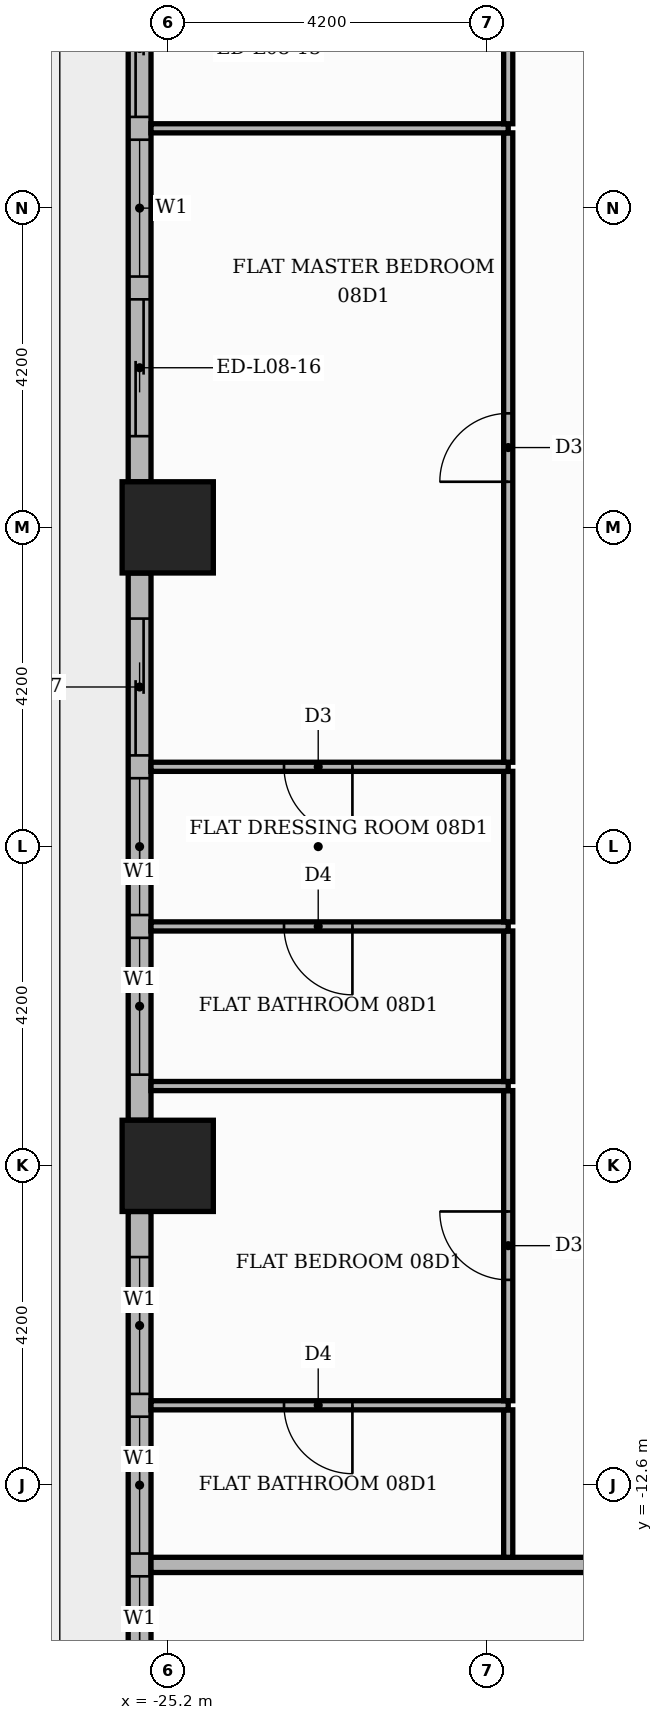
"""IFC4 building model, lengths in metres.
Left out: names, types, materials, properties, quantities, classifications, styles, units other than length and angle.
Written with IfcOpenShell. Run it as: python <this file> out.ifc"""

import sys

from ifc_helpers import new_model, si_unit, direction, frame, frame_2d, origin, origin_2d, place, context, subcontext, project, spatial, rectangle, extrude, element, fill, save


model = new_model("IFC4")
c1 = context("Model", 3, precision=1e-05, world=origin(), true_north=direction((0.0, 1.0)))
c2 = subcontext(c1, "Body", "Model", "MODEL_VIEW")
j1 = project(units=[si_unit("LENGTHUNIT", "METRE"), si_unit("PLANEANGLEUNIT", "RADIAN")], contexts=[c1])
p1 = place(None, origin())
s1 = spatial("IfcSite", under=j1, at=p1, CompositionType="ELEMENT")
p2 = place(p1, origin())
s2 = spatial("IfcBuilding", under=s1, at=p2, CompositionType="ELEMENT")
p3 = place(p2, frame((0.0, 0.0, 38.7)))
s3 = spatial("IfcBuildingStorey", under=s2, at=p3, CompositionType="ELEMENT", Elevation=38.7)
for number, where, z_axis, x_axis in (
    (1, (-25.2, 0.0, 0.0), (0.0, 0.0, 1.0), (1.0, 0.0, 0.0)),
    (2, (-25.2, -8.4, 0.0), (0.0, 0.0, 1.0), (1.0, 0.0, 0.0)),
):
    element("IfcColumn", number, at=place(p3, frame(where, z_axis=z_axis, x_axis=x_axis)), inside=s3, PredefinedType="COLUMN", context=c2, shape_type="SweptSolid", body=[
        extrude(rectangle(XDim=1.2, YDim=1.2, at=origin_2d()), origin(), (0.0, 0.0, 1.0), 3.9),
    ])
p4 = place(p3, frame((-25.57, 7.8, 0.0), z_axis=(0.0, 0.0, 1.0), x_axis=(0.0, -1.0, 0.0)))
e3 = element("IfcWall", 3, at=p4, inside=s3, PredefinedType="STANDARD", context=c2, shape_type="SweptSolid", body=[
    extrude(rectangle(XDim=7.2, YDim=0.3, at=frame_2d((3.6, 0.0))), origin(), (0.0, 0.0, 1.0), 3.48),
])
p5 = place(p4, frame((0.6, 0.0, 0.0)))
e4 = element("IfcOpeningElement", 4, at=p5, cuts=e3, PredefinedType="OPENING", context=c2, shape_type="SweptSolid", body=[
    extrude(rectangle(XDim=1.8, YDim=2.4, at=frame_2d((0.9, 1.2))), frame((0.0, 0.16, 0.0), z_axis=(0.0, -1.0, 0.0), x_axis=(1.0, 0.0, 0.0)), (0.0, 0.0, 1.0), 0.32),
])
p6 = place(p4, frame((2.7, 0.0, 0.9)))
e5 = element("IfcOpeningElement", 5, at=p6, cuts=e3, PredefinedType="OPENING", context=c2, shape_type="SweptSolid", body=[
    extrude(rectangle(XDim=1.8, YDim=2.1, at=frame_2d((0.9, 1.05))), frame((0.0, 0.16, 0.0), z_axis=(0.0, -1.0, 0.0), x_axis=(1.0, 0.0, 0.0)), (0.0, 0.0, 1.0), 0.32),
])
p7 = place(p4, frame((4.8, 0.0, 0.0)))
e6 = element("IfcOpeningElement", 6, at=p7, cuts=e3, PredefinedType="OPENING", context=c2, shape_type="SweptSolid", body=[
    extrude(rectangle(XDim=1.8, YDim=2.4, at=frame_2d((0.9, 1.2))), frame((0.0, 0.16, 0.0), z_axis=(0.0, -1.0, 0.0), x_axis=(1.0, 0.0, 0.0)), (0.0, 0.0, 1.0), 0.32),
])
p8 = place(p3, frame((-25.57, -0.6, 0.0), z_axis=(0.0, 0.0, 1.0), x_axis=(0.0, -1.0, 0.0)))
e7 = element("IfcWall", 7, at=p8, inside=s3, PredefinedType="STANDARD", context=c2, shape_type="SweptSolid", body=[
    extrude(rectangle(XDim=7.2, YDim=0.3, at=frame_2d((3.6, 0.0))), origin(), (0.0, 0.0, 1.0), 3.48),
])
p9 = place(p8, frame((0.6, 0.0, 0.0)))
e8 = element("IfcOpeningElement", 8, at=p9, cuts=e7, PredefinedType="OPENING", context=c2, shape_type="SweptSolid", body=[
    extrude(rectangle(XDim=1.8, YDim=2.4, at=frame_2d((0.9, 1.2))), frame((0.0, 0.16, 0.0), z_axis=(0.0, -1.0, 0.0), x_axis=(1.0, 0.0, 0.0)), (0.0, 0.0, 1.0), 0.32),
])
p10 = place(p8, frame((2.7, 0.0, 0.9)))
e9 = element("IfcOpeningElement", 9, at=p10, cuts=e7, PredefinedType="OPENING", context=c2, shape_type="SweptSolid", body=[
    extrude(rectangle(XDim=1.8, YDim=2.1, at=frame_2d((0.9, 1.05))), frame((0.0, 0.16, 0.0), z_axis=(0.0, -1.0, 0.0), x_axis=(1.0, 0.0, 0.0)), (0.0, 0.0, 1.0), 0.32),
])
p11 = place(p8, frame((4.8, 0.0, 0.9)))
e10 = element("IfcOpeningElement", 10, at=p11, cuts=e7, PredefinedType="OPENING", context=c2, shape_type="SweptSolid", body=[
    extrude(rectangle(XDim=1.8, YDim=2.1, at=frame_2d((0.9, 1.05))), frame((0.0, 0.16, 0.0), z_axis=(0.0, -1.0, 0.0), x_axis=(1.0, 0.0, 0.0)), (0.0, 0.0, 1.0), 0.32),
])
p12 = place(p3, frame((-25.57, -9.0, 0.0), z_axis=(0.0, 0.0, 1.0), x_axis=(0.0, -1.0, 0.0)))
e11 = element("IfcWall", 11, at=p12, inside=s3, PredefinedType="STANDARD", context=c2, shape_type="SweptSolid", body=[
    extrude(rectangle(XDim=7.2, YDim=0.3, at=frame_2d((3.6, 0.0))), origin(), (0.0, 0.0, 1.0), 3.48),
])
p13 = place(p12, frame((0.6, 0.0, 0.9)))
e12 = element("IfcOpeningElement", 12, at=p13, cuts=e11, PredefinedType="OPENING", context=c2, shape_type="SweptSolid", body=[
    extrude(rectangle(XDim=1.8, YDim=2.1, at=frame_2d((0.9, 1.05))), frame((0.0, 0.16, 0.0), z_axis=(0.0, -1.0, 0.0), x_axis=(1.0, 0.0, 0.0)), (0.0, 0.0, 1.0), 0.32),
])
p14 = place(p12, frame((2.7, 0.0, 0.9)))
e13 = element("IfcOpeningElement", 13, at=p14, cuts=e11, PredefinedType="OPENING", context=c2, shape_type="SweptSolid", body=[
    extrude(rectangle(XDim=1.8, YDim=2.1, at=frame_2d((0.9, 1.05))), frame((0.0, 0.16, 0.0), z_axis=(0.0, -1.0, 0.0), x_axis=(1.0, 0.0, 0.0)), (0.0, 0.0, 1.0), 0.32),
])
p15 = place(p12, frame((4.8, 0.0, 0.9)))
e14 = element("IfcOpeningElement", 14, at=p15, cuts=e11, PredefinedType="OPENING", context=c2, shape_type="SweptSolid", body=[
    extrude(rectangle(XDim=1.8, YDim=2.1, at=frame_2d((0.9, 1.05))), frame((0.0, 0.16, 0.0), z_axis=(0.0, -1.0, 0.0), x_axis=(1.0, 0.0, 0.0)), (0.0, 0.0, 1.0), 0.32),
])
p16 = place(p3, frame((-25.42, -13.65, 0.0), z_axis=(0.0, 0.0, 1.0), x_axis=(1.0, 0.0, 0.0)))
e15 = element("IfcWall", 15, at=p16, inside=s3, PredefinedType="PARTITIONING", context=c2, shape_type="SweptSolid", body=[
    extrude(rectangle(XDim=39.07, YDim=0.2, at=frame_2d((19.535, 0.0))), origin(), (0.0, 0.0, 1.0), 3.48),
])
p17 = place(p16, frame((13.32, 0.0, 0.0)))
e16 = element("IfcOpeningElement", 16, at=p17, cuts=e15, PredefinedType="OPENING", context=c2, shape_type="SweptSolid", body=[
    extrude(rectangle(XDim=1.1, YDim=2.4, at=frame_2d((0.55, 1.2))), frame((0.0, 0.11, 0.0), z_axis=(0.0, -1.0, 0.0), x_axis=(1.0, 0.0, 0.0)), (0.0, 0.0, 1.0), 0.22),
])
p18 = place(p16, frame((21.72, 0.0, 0.0)))
e17 = element("IfcOpeningElement", 17, at=p18, cuts=e15, PredefinedType="OPENING", context=c2, shape_type="SweptSolid", body=[
    extrude(rectangle(XDim=1.1, YDim=2.4, at=frame_2d((0.55, 1.2))), frame((0.0, 0.11, 0.0), z_axis=(0.0, -1.0, 0.0), x_axis=(1.0, 0.0, 0.0)), (0.0, 0.0, 1.0), 0.22),
])
p19 = place(p3, frame((-20.72, -13.55, 0.0), z_axis=(0.0, 0.0, 1.0), x_axis=(0.0, 1.0, 0.0)))
e18 = element("IfcWall", 18, at=p19, inside=s3, PredefinedType="PARTITIONING", context=c2, shape_type="SweptSolid", body=[
    extrude(rectangle(XDim=1.94, YDim=0.12, at=frame_2d((0.97, 0.0))), origin(), (0.0, 0.0, 1.0), 3.48),
])
p20 = place(p3, frame((-25.42, -11.55, 0.0), z_axis=(0.0, 0.0, 1.0), x_axis=(1.0, 0.0, 0.0)))
e19 = element("IfcWall", 19, at=p20, inside=s3, PredefinedType="PARTITIONING", context=c2, shape_type="SweptSolid", body=[
    extrude(rectangle(XDim=4.7, YDim=0.12, at=frame_2d((2.35, 0.0))), origin(), (0.0, 0.0, 1.0), 3.48),
])
p21 = place(p20, frame((1.75, 0.0, 0.0)))
e20 = element("IfcOpeningElement", 20, at=p21, cuts=e19, PredefinedType="OPENING", context=c2, shape_type="SweptSolid", body=[
    extrude(rectangle(XDim=0.9, YDim=2.1, at=frame_2d((0.45, 1.05))), frame((0.0, 0.07, 0.0), z_axis=(0.0, -1.0, 0.0), x_axis=(1.0, 0.0, 0.0)), (0.0, 0.0, 1.0), 0.14),
])
p22 = place(p3, frame((-20.72, -11.49, 0.0), z_axis=(0.0, 0.0, 1.0), x_axis=(0.0, 1.0, 0.0)))
e21 = element("IfcWall", 21, at=p22, inside=s3, PredefinedType="PARTITIONING", context=c2, shape_type="SweptSolid", body=[
    extrude(rectangle(XDim=4.08, YDim=0.12, at=frame_2d((2.04, 0.0))), origin(), (0.0, 0.0, 1.0), 3.48),
])
p23 = place(p22, frame((1.59, 0.0, 0.0)))
e22 = element("IfcOpeningElement", 22, at=p23, cuts=e21, PredefinedType="OPENING", context=c2, shape_type="SweptSolid", body=[
    extrude(rectangle(XDim=0.9, YDim=2.1, at=frame_2d((0.45, 1.05))), frame((0.0, 0.07, 0.0), z_axis=(0.0, -1.0, 0.0), x_axis=(1.0, 0.0, 0.0)), (0.0, 0.0, 1.0), 0.14),
])
p24 = place(p3, frame((-25.42, -7.35, 0.0), z_axis=(0.0, 0.0, 1.0), x_axis=(1.0, 0.0, 0.0)))
e23 = element("IfcWall", 23, at=p24, inside=s3, PredefinedType="PARTITIONING", context=c2, shape_type="SweptSolid", body=[
    extrude(rectangle(XDim=4.7, YDim=0.12, at=frame_2d((2.35, 0.0))), origin(), (0.0, 0.0, 1.0), 3.48),
])
p25 = place(p3, frame((-20.72, -7.29, 0.0), z_axis=(0.0, 0.0, 1.0), x_axis=(0.0, 1.0, 0.0)))
e24 = element("IfcWall", 24, at=p25, inside=s3, PredefinedType="PARTITIONING", context=c2, shape_type="SweptSolid", body=[
    extrude(rectangle(XDim=1.98, YDim=0.12, at=frame_2d((0.99, 0.0))), origin(), (0.0, 0.0, 1.0), 3.48),
])
p26 = place(p3, frame((-25.42, -5.25, 0.0), z_axis=(0.0, 0.0, 1.0), x_axis=(1.0, 0.0, 0.0)))
e25 = element("IfcWall", 25, at=p26, inside=s3, PredefinedType="PARTITIONING", context=c2, shape_type="SweptSolid", body=[
    extrude(rectangle(XDim=4.7, YDim=0.12, at=frame_2d((2.35, 0.0))), origin(), (0.0, 0.0, 1.0), 3.48),
])
p27 = place(p26, frame((1.75, 0.0, 0.0)))
e26 = element("IfcOpeningElement", 26, at=p27, cuts=e25, PredefinedType="OPENING", context=c2, shape_type="SweptSolid", body=[
    extrude(rectangle(XDim=0.9, YDim=2.1, at=frame_2d((0.45, 1.05))), frame((0.0, 0.07, 0.0), z_axis=(0.0, -1.0, 0.0), x_axis=(1.0, 0.0, 0.0)), (0.0, 0.0, 1.0), 0.14),
])
p28 = place(p3, frame((-20.72, -5.19, 0.0), z_axis=(0.0, 0.0, 1.0), x_axis=(0.0, 1.0, 0.0)))
e27 = element("IfcWall", 27, at=p28, inside=s3, PredefinedType="PARTITIONING", context=c2, shape_type="SweptSolid", body=[
    extrude(rectangle(XDim=1.98, YDim=0.12, at=frame_2d((0.99, 0.0))), origin(), (0.0, 0.0, 1.0), 3.48),
])
p29 = place(p3, frame((-25.42, -3.15, 0.0), z_axis=(0.0, 0.0, 1.0), x_axis=(1.0, 0.0, 0.0)))
e28 = element("IfcWall", 28, at=p29, inside=s3, PredefinedType="PARTITIONING", context=c2, shape_type="SweptSolid", body=[
    extrude(rectangle(XDim=4.7, YDim=0.12, at=frame_2d((2.35, 0.0))), origin(), (0.0, 0.0, 1.0), 3.48),
])
p30 = place(p29, frame((1.75, 0.0, 0.0)))
e29 = element("IfcOpeningElement", 29, at=p30, cuts=e28, PredefinedType="OPENING", context=c2, shape_type="SweptSolid", body=[
    extrude(rectangle(XDim=0.9, YDim=2.1, at=frame_2d((0.45, 1.05))), frame((0.0, 0.07, 0.0), z_axis=(0.0, -1.0, 0.0), x_axis=(1.0, 0.0, 0.0)), (0.0, 0.0, 1.0), 0.14),
])
p31 = place(p3, frame((-20.72, -3.09, 0.0), z_axis=(0.0, 0.0, 1.0), x_axis=(0.0, 1.0, 0.0)))
e30 = element("IfcWall", 30, at=p31, inside=s3, PredefinedType="PARTITIONING", context=c2, shape_type="SweptSolid", body=[
    extrude(rectangle(XDim=8.28, YDim=0.12, at=frame_2d((4.14, 0.0))), origin(), (0.0, 0.0, 1.0), 3.48),
])
p32 = place(p31, frame((3.69, 0.0, 0.0)))
e31 = element("IfcOpeningElement", 31, at=p32, cuts=e30, PredefinedType="OPENING", context=c2, shape_type="SweptSolid", body=[
    extrude(rectangle(XDim=0.9, YDim=2.1, at=frame_2d((0.45, 1.05))), frame((0.0, 0.07, 0.0), z_axis=(0.0, -1.0, 0.0), x_axis=(1.0, 0.0, 0.0)), (0.0, 0.0, 1.0), 0.14),
])
p33 = place(p3, frame((-25.42, 5.25, 0.0), z_axis=(0.0, 0.0, 1.0), x_axis=(1.0, 0.0, 0.0)))
e32 = element("IfcWall", 32, at=p33, inside=s3, PredefinedType="PARTITIONING", context=c2, shape_type="SweptSolid", body=[
    extrude(rectangle(XDim=4.7, YDim=0.12, at=frame_2d((2.35, 0.0))), origin(), (0.0, 0.0, 1.0), 3.48),
])
p34 = place(p3, frame((-20.72, 5.31, 0.0), z_axis=(0.0, 0.0, 1.0), x_axis=(0.0, 1.0, 0.0)))
e33 = element("IfcWall", 33, at=p34, inside=s3, PredefinedType="PARTITIONING", context=c2, shape_type="SweptSolid", body=[
    extrude(rectangle(XDim=8.28, YDim=0.12, at=frame_2d((4.14, 0.0))), origin(), (0.0, 0.0, 1.0), 3.48),
])
p35 = place(p34, frame((3.64, 0.0, 0.0)))
e34 = element("IfcOpeningElement", 34, at=p35, cuts=e33, PredefinedType="OPENING", context=c2, shape_type="SweptSolid", body=[
    extrude(rectangle(XDim=1.0, YDim=2.1, at=frame_2d((0.5, 1.05))), frame((0.0, 0.07, 0.0), z_axis=(0.0, -1.0, 0.0), x_axis=(1.0, 0.0, 0.0)), (0.0, 0.0, 1.0), 0.14),
])
p36 = place(p5, origin())
e35 = element("IfcDoor", 35, at=p36, inside=s3, OperationType="SLIDING_TO_LEFT", PredefinedType="DOOR", context=c2, shape_type="SweptSolid", body=[
    extrude(rectangle(XDim=1.8, YDim=2.4, at=frame_2d((0.9, 1.2))), frame((0.0, 0.025, 0.0), z_axis=(0.0, -1.0, 0.0), x_axis=(1.0, 0.0, 0.0)), (0.0, 0.0, 1.0), 0.05),
])
fill(e4, e35)
p37 = place(p6, origin())
e36 = element("IfcWindow", 36, at=p37, inside=s3, PartitioningType="SINGLE_PANEL", PredefinedType="WINDOW", context=c2, shape_type="SweptSolid", body=[
    extrude(rectangle(XDim=1.8, YDim=2.1, at=frame_2d((0.9, 1.05))), frame((0.0, 0.03, 0.0), z_axis=(0.0, -1.0, 0.0), x_axis=(1.0, 0.0, 0.0)), (0.0, 0.0, 1.0), 0.06),
])
fill(e5, e36)
p38 = place(p7, origin())
e37 = element("IfcDoor", 37, at=p38, inside=s3, OperationType="SLIDING_TO_RIGHT", PredefinedType="DOOR", context=c2, shape_type="SweptSolid", body=[
    extrude(rectangle(XDim=1.8, YDim=2.4, at=frame_2d((0.9, 1.2))), frame((0.0, 0.025, 0.0), z_axis=(0.0, -1.0, 0.0), x_axis=(1.0, 0.0, 0.0)), (0.0, 0.0, 1.0), 0.05),
])
fill(e6, e37)
p39 = place(p9, origin())
e38 = element("IfcDoor", 38, at=p39, inside=s3, OperationType="SLIDING_TO_LEFT", PredefinedType="DOOR", context=c2, shape_type="SweptSolid", body=[
    extrude(rectangle(XDim=1.8, YDim=2.4, at=frame_2d((0.9, 1.2))), frame((0.0, 0.025, 0.0), z_axis=(0.0, -1.0, 0.0), x_axis=(1.0, 0.0, 0.0)), (0.0, 0.0, 1.0), 0.05),
])
fill(e8, e38)
p40 = place(p10, origin())
e39 = element("IfcWindow", 39, at=p40, inside=s3, PartitioningType="SINGLE_PANEL", PredefinedType="WINDOW", context=c2, shape_type="SweptSolid", body=[
    extrude(rectangle(XDim=1.8, YDim=2.1, at=frame_2d((0.9, 1.05))), frame((0.0, 0.03, 0.0), z_axis=(0.0, -1.0, 0.0), x_axis=(1.0, 0.0, 0.0)), (0.0, 0.0, 1.0), 0.06),
])
fill(e9, e39)
p41 = place(p11, origin())
e40 = element("IfcWindow", 40, at=p41, inside=s3, PartitioningType="SINGLE_PANEL", PredefinedType="WINDOW", context=c2, shape_type="SweptSolid", body=[
    extrude(rectangle(XDim=1.8, YDim=2.1, at=frame_2d((0.9, 1.05))), frame((0.0, 0.03, 0.0), z_axis=(0.0, -1.0, 0.0), x_axis=(1.0, 0.0, 0.0)), (0.0, 0.0, 1.0), 0.06),
])
fill(e10, e40)
p42 = place(p13, origin())
e41 = element("IfcWindow", 41, at=p42, inside=s3, PartitioningType="SINGLE_PANEL", PredefinedType="WINDOW", context=c2, shape_type="SweptSolid", body=[
    extrude(rectangle(XDim=1.8, YDim=2.1, at=frame_2d((0.9, 1.05))), frame((0.0, 0.03, 0.0), z_axis=(0.0, -1.0, 0.0), x_axis=(1.0, 0.0, 0.0)), (0.0, 0.0, 1.0), 0.06),
])
fill(e12, e41)
p43 = place(p14, origin())
e42 = element("IfcWindow", 42, at=p43, inside=s3, PartitioningType="SINGLE_PANEL", PredefinedType="WINDOW", context=c2, shape_type="SweptSolid", body=[
    extrude(rectangle(XDim=1.8, YDim=2.1, at=frame_2d((0.9, 1.05))), frame((0.0, 0.03, 0.0), z_axis=(0.0, -1.0, 0.0), x_axis=(1.0, 0.0, 0.0)), (0.0, 0.0, 1.0), 0.06),
])
fill(e13, e42)
p44 = place(p15, origin())
e43 = element("IfcWindow", 43, at=p44, inside=s3, PartitioningType="SINGLE_PANEL", PredefinedType="WINDOW", context=c2, shape_type="SweptSolid", body=[
    extrude(rectangle(XDim=1.8, YDim=2.1, at=frame_2d((0.9, 1.05))), frame((0.0, 0.03, 0.0), z_axis=(0.0, -1.0, 0.0), x_axis=(1.0, 0.0, 0.0)), (0.0, 0.0, 1.0), 0.06),
])
fill(e14, e43)
p45 = place(p32, origin())
e44 = element("IfcDoor", 44, at=p45, inside=s3, OperationType="SINGLE_SWING_LEFT", PredefinedType="DOOR", context=c2, shape_type="SweptSolid", body=[
    extrude(rectangle(XDim=0.9, YDim=2.1, at=frame_2d((0.45, 1.05))), frame((0.0, 0.025, 0.0), z_axis=(0.0, -1.0, 0.0), x_axis=(1.0, 0.0, 0.0)), (0.0, 0.0, 1.0), 0.05),
])
fill(e31, e44)
p46 = place(p30, frame((0.9, 0.0, 0.0), z_axis=(0.0, 0.0, 1.0), x_axis=(-1.0, 0.0, 0.0)))
e45 = element("IfcDoor", 45, at=p46, inside=s3, OperationType="SINGLE_SWING_RIGHT", PredefinedType="DOOR", context=c2, shape_type="SweptSolid", body=[
    extrude(rectangle(XDim=0.9, YDim=2.1, at=frame_2d((0.45, 1.05))), frame((0.0, 0.025, 0.0), z_axis=(0.0, -1.0, 0.0), x_axis=(1.0, 0.0, 0.0)), (0.0, 0.0, 1.0), 0.05),
])
fill(e29, e45)
p47 = place(p27, frame((0.9, 0.0, 0.0), z_axis=(0.0, 0.0, 1.0), x_axis=(-1.0, 0.0, 0.0)))
e46 = element("IfcDoor", 46, at=p47, inside=s3, OperationType="SINGLE_SWING_RIGHT", PredefinedType="DOOR", context=c2, shape_type="SweptSolid", body=[
    extrude(rectangle(XDim=0.9, YDim=2.1, at=frame_2d((0.45, 1.05))), frame((0.0, 0.025, 0.0), z_axis=(0.0, -1.0, 0.0), x_axis=(1.0, 0.0, 0.0)), (0.0, 0.0, 1.0), 0.05),
])
fill(e26, e46)
p48 = place(p23, origin())
e47 = element("IfcDoor", 47, at=p48, inside=s3, OperationType="SINGLE_SWING_RIGHT", PredefinedType="DOOR", context=c2, shape_type="SweptSolid", body=[
    extrude(rectangle(XDim=0.9, YDim=2.1, at=frame_2d((0.45, 1.05))), frame((0.0, 0.025, 0.0), z_axis=(0.0, -1.0, 0.0), x_axis=(1.0, 0.0, 0.0)), (0.0, 0.0, 1.0), 0.05),
])
fill(e22, e47)
p49 = place(p21, frame((0.9, 0.0, 0.0), z_axis=(0.0, 0.0, 1.0), x_axis=(-1.0, 0.0, 0.0)))
e48 = element("IfcDoor", 48, at=p49, inside=s3, OperationType="SINGLE_SWING_RIGHT", PredefinedType="DOOR", context=c2, shape_type="SweptSolid", body=[
    extrude(rectangle(XDim=0.9, YDim=2.1, at=frame_2d((0.45, 1.05))), frame((0.0, 0.025, 0.0), z_axis=(0.0, -1.0, 0.0), x_axis=(1.0, 0.0, 0.0)), (0.0, 0.0, 1.0), 0.05),
])
fill(e20, e48)
save(model, sys.argv[1])
